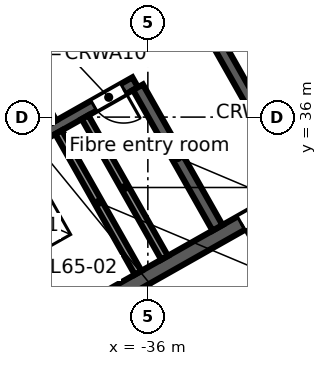
"""IFC4 building model, lengths in metres.
Left out: names, types, materials, properties, quantities, classifications, styles, units other than length and angle.
Written with IfcOpenShell. Run it as: python <this file> out.ifc"""

import sys

from ifc_helpers import new_model, si_unit, direction, frame, frame_2d, origin, place, context, subcontext, project, spatial, rectangle, extrude, element, fill, save


model = new_model("IFC4")
c1 = context("Model", 3, precision=1e-05, world=origin(), true_north=direction((0.0, 1.0)))
c2 = subcontext(c1, "Body", "Model", "MODEL_VIEW")
j1 = project(units=[si_unit("LENGTHUNIT", "METRE"), si_unit("PLANEANGLEUNIT", "RADIAN")], contexts=[c1])
p1 = place(None, origin())
s1 = spatial("IfcSite", under=j1, at=p1, CompositionType="ELEMENT")
p2 = place(p1, origin())
s2 = spatial("IfcBuilding", under=s1, at=p2, CompositionType="ELEMENT")
p3 = place(p2, frame((0.0, 0.0, 300.7)))
s3 = spatial("IfcBuildingStorey", under=s2, at=p3, CompositionType="ELEMENT", Elevation=300.7)
p4 = place(p3, frame((-3.017, 46.293, 0.0), z_axis=(0.0, 0.0, 1.0), x_axis=(-0.870355474887, -0.492423950812, 0.0)))
e1 = element("IfcWall", 1, at=p4, inside=s3, PredefinedType="STANDARD", context=c2, shape_type="SweptSolid", body=[
    extrude(rectangle(XDim=40.34, YDim=0.25, at=frame_2d((20.17, 0.0))), origin(), (0.0, 0.0, 1.0), 3.52),
])
p5 = place(p4, frame((37.428, 0.0, 0.8)))
e2 = element("IfcOpeningElement", 2, at=p5, cuts=e1, PredefinedType="OPENING", context=c2, shape_type="SweptSolid", body=[
    extrude(rectangle(XDim=2.4, YDim=2.2, at=frame_2d((1.2, 1.1))), frame((0.0, 0.135, 0.0), z_axis=(0.0, -1.0, 0.0), x_axis=(1.0, 0.0, 0.0)), (0.0, 0.0, 1.0), 0.27),
])
p6 = place(p4, frame((34.372, 0.0, 0.0)))
e3 = element("IfcOpeningElement", 3, at=p6, cuts=e1, PredefinedType="OPENING", context=c2, shape_type="SweptSolid", body=[
    extrude(rectangle(XDim=1.8, YDim=2.4, at=frame_2d((0.9, 1.2))), frame((0.0, 0.135, 0.0), z_axis=(0.0, -1.0, 0.0), x_axis=(1.0, 0.0, 0.0)), (0.0, 0.0, 1.0), 0.27),
])
p7 = place(p4, frame((30.716, 0.0, 0.8)))
e4 = element("IfcOpeningElement", 4, at=p7, cuts=e1, PredefinedType="OPENING", context=c2, shape_type="SweptSolid", body=[
    extrude(rectangle(XDim=2.4, YDim=2.2, at=frame_2d((1.2, 1.1))), frame((0.0, 0.135, 0.0), z_axis=(0.0, -1.0, 0.0), x_axis=(1.0, 0.0, 0.0)), (0.0, 0.0, 1.0), 0.27),
])
p8 = place(p4, frame((27.36, 0.0, 0.8)))
e5 = element("IfcOpeningElement", 5, at=p8, cuts=e1, PredefinedType="OPENING", context=c2, shape_type="SweptSolid", body=[
    extrude(rectangle(XDim=2.4, YDim=2.2, at=frame_2d((1.2, 1.1))), frame((0.0, 0.135, 0.0), z_axis=(0.0, -1.0, 0.0), x_axis=(1.0, 0.0, 0.0)), (0.0, 0.0, 1.0), 0.27),
])
p9 = place(p4, frame((24.304, 0.0, 0.0)))
e6 = element("IfcOpeningElement", 6, at=p9, cuts=e1, PredefinedType="OPENING", context=c2, shape_type="SweptSolid", body=[
    extrude(rectangle(XDim=1.8, YDim=2.4, at=frame_2d((0.9, 1.2))), frame((0.0, 0.135, 0.0), z_axis=(0.0, -1.0, 0.0), x_axis=(1.0, 0.0, 0.0)), (0.0, 0.0, 1.0), 0.27),
])
p10 = place(p4, frame((20.648, 0.0, 0.8)))
e7 = element("IfcOpeningElement", 7, at=p10, cuts=e1, PredefinedType="OPENING", context=c2, shape_type="SweptSolid", body=[
    extrude(rectangle(XDim=2.4, YDim=2.2, at=frame_2d((1.2, 1.1))), frame((0.0, 0.135, 0.0), z_axis=(0.0, -1.0, 0.0), x_axis=(1.0, 0.0, 0.0)), (0.0, 0.0, 1.0), 0.27),
])
p11 = place(p4, frame((17.292, 0.0, 0.8)))
e8 = element("IfcOpeningElement", 8, at=p11, cuts=e1, PredefinedType="OPENING", context=c2, shape_type="SweptSolid", body=[
    extrude(rectangle(XDim=2.4, YDim=2.2, at=frame_2d((1.2, 1.1))), frame((0.0, 0.135, 0.0), z_axis=(0.0, -1.0, 0.0), x_axis=(1.0, 0.0, 0.0)), (0.0, 0.0, 1.0), 0.27),
])
p12 = place(p4, frame((14.236, 0.0, 0.0)))
e9 = element("IfcOpeningElement", 9, at=p12, cuts=e1, PredefinedType="OPENING", context=c2, shape_type="SweptSolid", body=[
    extrude(rectangle(XDim=1.8, YDim=2.4, at=frame_2d((0.9, 1.2))), frame((0.0, 0.135, 0.0), z_axis=(0.0, -1.0, 0.0), x_axis=(1.0, 0.0, 0.0)), (0.0, 0.0, 1.0), 0.27),
])
p13 = place(p4, frame((10.58, 0.0, 0.8)))
e10 = element("IfcOpeningElement", 10, at=p13, cuts=e1, PredefinedType="OPENING", context=c2, shape_type="SweptSolid", body=[
    extrude(rectangle(XDim=2.4, YDim=2.2, at=frame_2d((1.2, 1.1))), frame((0.0, 0.135, 0.0), z_axis=(0.0, -1.0, 0.0), x_axis=(1.0, 0.0, 0.0)), (0.0, 0.0, 1.0), 0.27),
])
p14 = place(p4, frame((7.224, 0.0, 0.8)))
e11 = element("IfcOpeningElement", 11, at=p14, cuts=e1, PredefinedType="OPENING", context=c2, shape_type="SweptSolid", body=[
    extrude(rectangle(XDim=2.4, YDim=2.2, at=frame_2d((1.2, 1.1))), frame((0.0, 0.135, 0.0), z_axis=(0.0, -1.0, 0.0), x_axis=(1.0, 0.0, 0.0)), (0.0, 0.0, 1.0), 0.27),
])
p15 = place(p4, frame((4.168, 0.0, 0.0)))
e12 = element("IfcOpeningElement", 12, at=p15, cuts=e1, PredefinedType="OPENING", context=c2, shape_type="SweptSolid", body=[
    extrude(rectangle(XDim=1.8, YDim=2.4, at=frame_2d((0.9, 1.2))), frame((0.0, 0.135, 0.0), z_axis=(0.0, -1.0, 0.0), x_axis=(1.0, 0.0, 0.0)), (0.0, 0.0, 1.0), 0.27),
])
p16 = place(p4, frame((0.512, 0.0, 0.8)))
e13 = element("IfcOpeningElement", 13, at=p16, cuts=e1, PredefinedType="OPENING", context=c2, shape_type="SweptSolid", body=[
    extrude(rectangle(XDim=2.4, YDim=2.2, at=frame_2d((1.2, 1.1))), frame((0.0, 0.135, 0.0), z_axis=(0.0, -1.0, 0.0), x_axis=(1.0, 0.0, 0.0)), (0.0, 0.0, 1.0), 0.27),
])
p17 = place(p3, frame((-39.813, 29.662, 0.0), z_axis=(0.0, 0.0, 1.0), x_axis=(0.870350116061, 0.492433422375, 0.0)))
e14 = element("IfcWall", 14, at=p17, inside=s3, PredefinedType="SOLIDWALL", context=c2, shape_type="SweptSolid", body=[
    extrude(rectangle(XDim=17.0, YDim=0.4, at=frame_2d((8.5, 0.0))), origin(), (0.0, 0.0, 1.0), 3.52),
])
p18 = place(p17, frame((7.2, 0.0, 0.0)))
e15 = element("IfcOpeningElement", 15, at=p18, cuts=e14, PredefinedType="OPENING", context=c2, shape_type="SweptSolid", body=[
    extrude(rectangle(XDim=1.2, YDim=2.1, at=frame_2d((0.6, 1.05))), frame((0.0, 0.21, 0.0), z_axis=(0.0, -1.0, 0.0), x_axis=(1.0, 0.0, 0.0)), (0.0, 0.0, 1.0), 0.42),
])
p19 = place(p3, frame((-41.73, 33.863, 0.0), z_axis=(0.0, 0.0, 1.0), x_axis=(0.870350800578, 0.492432212525, 0.0)))
e16 = element("IfcWall", 16, at=p19, inside=s3, PredefinedType="SOLIDWALL", context=c2, shape_type="SweptSolid", body=[
    extrude(rectangle(XDim=6.2, YDim=0.3, at=frame_2d((3.1, 0.0))), origin(), (0.0, 0.0, 1.0), 3.52),
])
p20 = place(p19, frame((1.3, 0.0, 0.0)))
e17 = element("IfcOpeningElement", 17, at=p20, cuts=e16, PredefinedType="OPENING", context=c2, shape_type="SweptSolid", body=[
    extrude(rectangle(XDim=1.1, YDim=2.1, at=frame_2d((0.55, 1.05))), frame((0.0, 0.16, 0.0), z_axis=(0.0, -1.0, 0.0), x_axis=(1.0, 0.0, 0.0)), (0.0, 0.0, 1.0), 0.32),
])
p21 = place(p19, frame((4.95, 0.0, 0.0)))
e18 = element("IfcOpeningElement", 18, at=p21, cuts=e16, PredefinedType="OPENING", context=c2, shape_type="SweptSolid", body=[
    extrude(rectangle(XDim=0.9, YDim=2.1, at=frame_2d((0.45, 1.05))), frame((0.0, 0.16, 0.0), z_axis=(0.0, -1.0, 0.0), x_axis=(1.0, 0.0, 0.0)), (0.0, 0.0, 1.0), 0.32),
])
p22 = place(p3, frame((-43.897, 37.692, 0.0), z_axis=(0.0, 0.0, 1.0), x_axis=(0.870356351998, 0.492422400523, 0.0)))
e19 = element("IfcWall", 19, at=p22, inside=s3, PredefinedType="SOLIDWALL", context=c2, shape_type="SweptSolid", body=[
    extrude(rectangle(XDim=7.6, YDim=0.3, at=frame_2d((3.8, 0.0))), origin(), (0.0, 0.0, 1.0), 3.52),
])
p23 = place(p22, frame((0.4, 0.0, 0.0)))
e20 = element("IfcOpeningElement", 20, at=p23, cuts=e19, PredefinedType="OPENING", context=c2, shape_type="SweptSolid", body=[
    extrude(rectangle(XDim=1.0, YDim=2.1, at=frame_2d((0.5, 1.05))), frame((0.0, 0.16, 0.0), z_axis=(0.0, -1.0, 0.0), x_axis=(1.0, 0.0, 0.0)), (0.0, 0.0, 1.0), 0.32),
])
p24 = place(p3, frame((-38.349, 35.603, 0.0), z_axis=(0.0, 0.0, 1.0), x_axis=(0.492397924348, -0.870370199454, 0.0)))
e21 = element("IfcWall", 21, at=p24, inside=s3, PredefinedType="SOLIDWALL", context=c2, shape_type="SweptSolid", body=[
    extrude(rectangle(XDim=4.25, YDim=0.2, at=frame_2d((2.125, 0.0))), origin(), (0.0, 0.0, 1.0), 3.52),
])
p25 = place(p3, frame((-40.516, 39.433, 0.0), z_axis=(0.0, 0.0, 1.0), x_axis=(0.492453559952, -0.87033872216, 0.0)))
e22 = element("IfcWall", 22, at=p25, inside=s3, PredefinedType="PARTITIONING", context=c2, shape_type="SweptSolid", body=[
    extrude(rectangle(XDim=4.1, YDim=0.2, at=frame_2d((2.05, 0.0))), origin(), (0.0, 0.0, 1.0), 3.52),
])
p26 = place(p25, frame((1.55, 0.0, 0.0)))
e23 = element("IfcOpeningElement", 23, at=p26, cuts=e22, PredefinedType="OPENING", context=c2, shape_type="SweptSolid", body=[
    extrude(rectangle(XDim=1.0, YDim=2.1, at=frame_2d((0.5, 1.05))), frame((0.0, 0.11, 0.0), z_axis=(0.0, -1.0, 0.0), x_axis=(1.0, 0.0, 0.0)), (0.0, 0.0, 1.0), 0.22),
])
p27 = place(p3, frame((-37.653, 35.997, 0.0), z_axis=(0.0, 0.0, 1.0), x_axis=(0.492422543467, -0.870356271124, 0.0)))
e24 = element("IfcWall", 24, at=p27, inside=s3, PredefinedType="SOLIDWALL", context=c2, shape_type="SweptSolid", body=[
    extrude(rectangle(XDim=4.25, YDim=0.2, at=frame_2d((2.125, 0.0))), origin(), (0.0, 0.0, 1.0), 3.52),
])
for number, where, z_axis, x_axis in (
    (25, (-36.26, 36.785, 0.0), (0.0, 0.0, 1.0), (0.492, -0.87, 0.0)),
    (26, (-34.171, 37.967, 0.0), (0.0, 0.0, 1.0), (0.492, -0.87, 0.0)),
):
    element("IfcWall", number, at=place(p3, frame(where, z_axis=z_axis, x_axis=x_axis)), inside=s3, PredefinedType="SOLIDWALL", context=c2, shape_type="SweptSolid", body=[
        extrude(rectangle(XDim=4.25, YDim=0.3, at=frame_2d((2.125, 0.0))), origin(), (0.0, 0.0, 1.0), 3.52),
    ])
p28 = place(p18, frame((1.2, 0.0, 0.0), z_axis=(0.0, 0.0, 1.0), x_axis=(-1.0, 0.0, 0.0)))
e27 = element("IfcDoor", 27, at=p28, inside=s3, OperationType="SINGLE_SWING_RIGHT", PredefinedType="DOOR", context=c2, shape_type="SweptSolid", body=[
    extrude(rectangle(XDim=1.2, YDim=2.1, at=frame_2d((0.6, 1.05))), frame((0.0, 0.025, 0.0), z_axis=(0.0, -1.0, 0.0), x_axis=(1.0, 0.0, 0.0)), (0.0, 0.0, 1.0), 0.05),
])
fill(e15, e27)
p29 = place(p21, frame((0.9, 0.0, 0.0), z_axis=(0.0, 0.0, 1.0), x_axis=(-1.0, 0.0, 0.0)))
e28 = element("IfcDoor", 28, at=p29, inside=s3, OperationType="SINGLE_SWING_LEFT", PredefinedType="DOOR", context=c2, shape_type="SweptSolid", body=[
    extrude(rectangle(XDim=0.9, YDim=2.1, at=frame_2d((0.45, 1.05))), frame((0.0, 0.025, 0.0), z_axis=(0.0, -1.0, 0.0), x_axis=(1.0, 0.0, 0.0)), (0.0, 0.0, 1.0), 0.05),
])
fill(e18, e28)
save(model, sys.argv[1])
